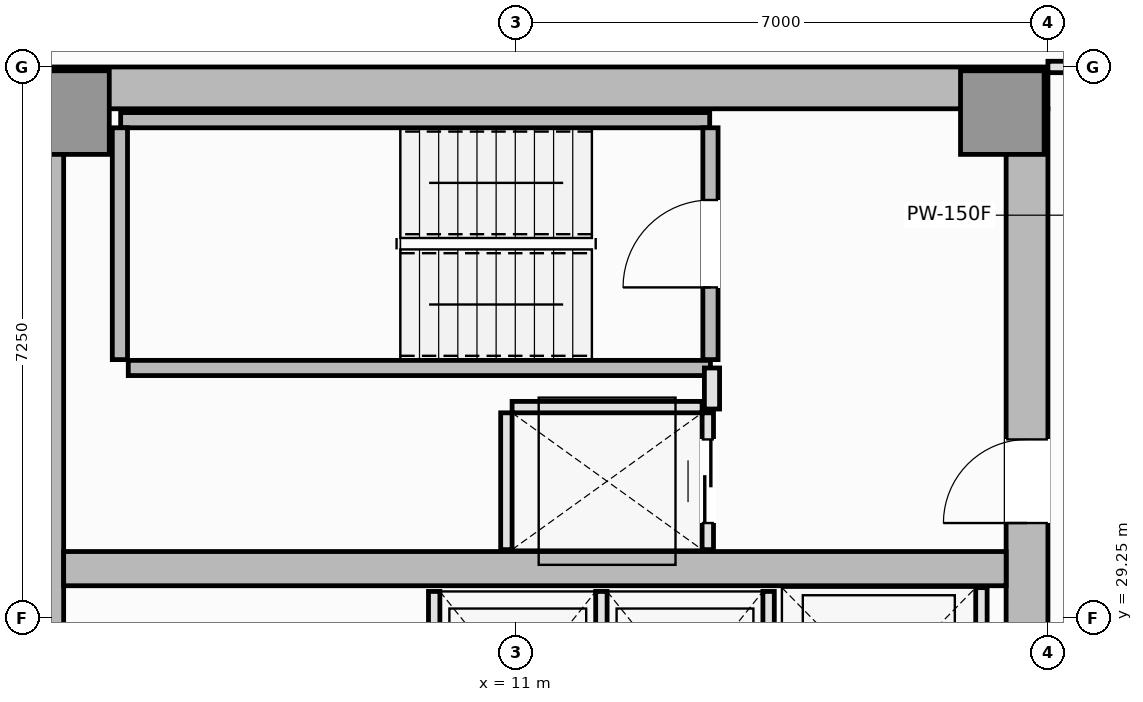
"""IFC4 building model, lengths in metres.
Left out: names, types, materials, properties, quantities, classifications, styles, units other than length and angle.
Written with IfcOpenShell. Run it as: python <this file> out.ifc"""

import sys

from ifc_helpers import new_model, si_unit, direction, frame, frame_2d, origin, origin_2d, place, context, subcontext, project, spatial, rectangle, extrude, element, fill, save


model = new_model("IFC4")
c1 = context("Model", 3, precision=1e-05, world=origin(), true_north=direction((0.0, 1.0)))
c2 = subcontext(c1, "Body", "Model", "MODEL_VIEW")
j1 = project(units=[si_unit("LENGTHUNIT", "METRE"), si_unit("PLANEANGLEUNIT", "RADIAN")], contexts=[c1])
p1 = place(None, origin())
s1 = spatial("IfcSite", under=j1, at=p1, CompositionType="ELEMENT")
p2 = place(p1, origin())
s2 = spatial("IfcBuilding", under=s1, at=p2, CompositionType="ELEMENT")
p3 = place(p2, frame((0.0, 0.0, 191.6)))
s3 = spatial("IfcBuildingStorey", under=s2, at=p3, CompositionType="ELEMENT", Elevation=191.6)
p4 = place(p3, frame((4.5, 36.225, 0.0), z_axis=(0.0, 0.0, 1.0), x_axis=(1.0, 0.0, 0.0)))
e1 = element("IfcWall", 1, at=p4, inside=s3, PredefinedType="SHEAR", context=c2, shape_type="SweptSolid", body=[
    extrude(rectangle(XDim=13.5, YDim=0.55, at=frame_2d((6.75, 0.0))), origin(), (0.0, 0.0, 1.0), 3.55),
])
p5 = place(p3, frame((4.775, 14.55, 0.0), z_axis=(0.0, 0.0, 1.0), x_axis=(0.0, 1.0, 0.0)))
e2 = element("IfcWall", 2, at=p5, inside=s3, PredefinedType="SHEAR", context=c2, shape_type="SweptSolid", body=[
    extrude(rectangle(XDim=21.4, YDim=0.55, at=frame_2d((10.7, 0.0))), origin(), (0.0, 0.0, 1.0), 3.55),
])
p6 = place(p3, frame((17.725, 27.05, 0.0), z_axis=(0.0, 0.0, 1.0), x_axis=(0.0, 1.0, 0.0)))
e3 = element("IfcWall", 3, at=p6, inside=s3, PredefinedType="SHEAR", context=c2, shape_type="SweptSolid", body=[
    extrude(rectangle(XDim=8.9, YDim=0.55, at=frame_2d((4.45, 0.0))), origin(), (0.0, 0.0, 1.0), 3.55),
])
p7 = place(p6, frame((3.45, 0.0, 0.0)))
e4 = element("IfcOpeningElement", 4, at=p7, cuts=e3, PredefinedType="OPENING", context=c2, shape_type="SweptSolid", body=[
    extrude(rectangle(XDim=1.1, YDim=2.15, at=frame_2d((0.55, 1.075))), frame((0.0, 0.285, 0.0), z_axis=(0.0, -1.0, 0.0), x_axis=(1.0, 0.0, 0.0)), (0.0, 0.0, 1.0), 0.57),
])
p8 = place(p3, frame((5.05, 29.9, 0.0), z_axis=(0.0, 0.0, 1.0), x_axis=(1.0, 0.0, 0.0)))
e5 = element("IfcWall", 5, at=p8, inside=s3, PredefinedType="SHEAR", context=c2, shape_type="SweptSolid", body=[
    extrude(rectangle(XDim=12.4, YDim=0.45, at=frame_2d((6.2, 0.0))), origin(), (0.0, 0.0, 1.0), 3.55),
])
for number, where, z_axis, x_axis in (
    (6, (5.1, 35.9, 0.0), (0.0, 0.0, 1.0), (1.0, 0.0, 0.0)),
    (7, (17.4, 35.9, 0.0), (0.0, 0.0, 1.0), (1.0, 0.0, 0.0)),
):
    element("IfcColumn", number, at=place(p3, frame(where, z_axis=z_axis, x_axis=x_axis)), inside=s3, PredefinedType="PILASTER", context=c2, shape_type="SweptSolid", body=[
        extrude(rectangle(XDim=1.1, YDim=1.1, at=origin_2d()), origin(), (0.0, 0.0, 1.0), 3.55),
    ])
p9 = place(p3, frame((5.8, 35.8, 0.0), z_axis=(0.0, 0.0, 1.0), x_axis=(1.0, 0.0, 0.0)))
e8 = element("IfcWall", 8, at=p9, inside=s3, PredefinedType="SOLIDWALL", context=c2, shape_type="SweptSolid", body=[
    extrude(rectangle(XDim=7.75, YDim=0.2, at=frame_2d((3.875, 0.0))), origin(), (0.0, 0.0, 1.0), 3.55),
])
p10 = place(p3, frame((5.79, 32.65, 0.0), z_axis=(0.0, 0.0, 1.0), x_axis=(0.0, 1.0, 0.0)))
e9 = element("IfcWall", 9, at=p10, inside=s3, PredefinedType="SOLIDWALL", context=c2, shape_type="SweptSolid", body=[
    extrude(rectangle(XDim=3.05, YDim=0.2, at=frame_2d((1.525, 0.0))), origin(), (0.0, 0.0, 1.0), 3.55),
])
p11 = place(p3, frame((5.9, 32.54, 0.0), z_axis=(0.0, 0.0, 1.0), x_axis=(1.0, 0.0, 0.0)))
e10 = element("IfcWall", 10, at=p11, inside=s3, PredefinedType="SOLIDWALL", context=c2, shape_type="SweptSolid", body=[
    extrude(rectangle(XDim=7.66, YDim=0.2, at=frame_2d((3.83, 0.0))), origin(), (0.0, 0.0, 1.0), 3.55),
])
p12 = place(p3, frame((13.56, 32.65, 0.0), z_axis=(0.0, 0.0, 1.0), x_axis=(0.0, 1.0, 0.0)))
e11 = element("IfcWall", 11, at=p12, inside=s3, PredefinedType="SOLIDWALL", context=c2, shape_type="SweptSolid", body=[
    extrude(rectangle(XDim=3.05, YDim=0.2, at=frame_2d((1.525, 0.0))), origin(), (0.0, 0.0, 1.0), 3.55),
])
p13 = place(p12, frame((0.95, 0.0, 0.0)))
e12 = element("IfcOpeningElement", 12, at=p13, cuts=e11, PredefinedType="OPENING", context=c2, shape_type="SweptSolid", body=[
    extrude(rectangle(XDim=1.15, YDim=2.15, at=frame_2d((0.575, 1.075))), frame((0.0, 0.11, 0.0), z_axis=(0.0, -1.0, 0.0), x_axis=(1.0, 0.0, 0.0)), (0.0, 0.0, 1.0), 0.22),
])
for number, where, z_axis, x_axis in (
    (13, (9.925, 27.05, 0.0), (0.0, 0.0, 1.0), (0.0, 1.0, 0.0)),
    (14, (12.125, 27.05, 0.0), (0.0, 0.0, 1.0), (0.0, 1.0, 0.0)),
    (15, (14.325, 27.05, 0.0), (0.0, 0.0, 1.0), (0.0, 1.0, 0.0)),
):
    element("IfcWall", number, at=place(p3, frame(where, z_axis=z_axis, x_axis=x_axis)), inside=s3, PredefinedType="PARTITIONING", context=c2, shape_type="SweptSolid", body=[
        extrude(rectangle(XDim=2.55, YDim=0.15, at=frame_2d((1.275, 0.0))), origin(), (0.0, 0.0, 1.0), 3.37),
    ])
p14 = place(p3, frame((17.125, 27.05, 0.0), z_axis=(0.0, 0.0, 1.0), x_axis=(0.0, 1.0, 0.0)))
e16 = element("IfcWall", 16, at=p14, inside=s3, PredefinedType="PARTITIONING", context=c2, shape_type="SweptSolid", body=[
    extrude(rectangle(XDim=2.6, YDim=0.15, at=frame_2d((1.3, 0.0))), origin(), (0.0, 0.0, 1.0), 3.37),
])
p15 = place(p3, frame((10.95, 32.025, 0.0), z_axis=(0.0, 0.0, 1.0), x_axis=(1.0, 0.0, 0.0)))
e17 = element("IfcWall", 17, at=p15, inside=s3, PredefinedType="PARTITIONING", context=c2, shape_type="SweptSolid", body=[
    extrude(rectangle(XDim=2.5, YDim=0.15, at=frame_2d((1.25, 0.0))), origin(), (0.0, 0.0, 1.0), 3.37),
])
p16 = place(p3, frame((10.875, 30.15, 0.0), z_axis=(0.0, 0.0, 1.0), x_axis=(0.0, 1.0, 0.0)))
e18 = element("IfcWall", 18, at=p16, inside=s3, PredefinedType="PARTITIONING", context=c2, shape_type="SweptSolid", body=[
    extrude(rectangle(XDim=1.8, YDim=0.15, at=frame_2d((0.9, 0.0))), origin(), (0.0, 0.0, 1.0), 3.37),
])
p17 = place(p3, frame((13.525, 30.15, 0.0), z_axis=(0.0, 0.0, 1.0), x_axis=(0.0, 1.0, 0.0)))
e19 = element("IfcWall", 19, at=p17, inside=s3, PredefinedType="PARTITIONING", context=c2, shape_type="SweptSolid", body=[
    extrude(rectangle(XDim=1.8, YDim=0.15, at=frame_2d((0.9, 0.0))), origin(), (0.0, 0.0, 1.0), 3.37),
])
p18 = place(p17, frame((0.35, 0.0, 0.0)))
e20 = element("IfcOpeningElement", 20, at=p18, cuts=e19, PredefinedType="OPENING", context=c2, shape_type="SweptSolid", body=[
    extrude(rectangle(XDim=1.1, YDim=2.2, at=frame_2d((0.55, 1.1))), frame((0.0, 0.085, 0.0), z_axis=(0.0, -1.0, 0.0), x_axis=(1.0, 0.0, 0.0)), (0.0, 0.0, 1.0), 0.17),
])
p19 = place(p3, frame((13.58, 32.0, 0.0), z_axis=(0.0, 0.0, 1.0), x_axis=(0.0, 1.0, 0.0)))
e21 = element("IfcWall", 21, at=p19, inside=s3, PredefinedType="PARTITIONING", context=c2, shape_type="SweptSolid", body=[
    extrude(rectangle(XDim=0.54, YDim=0.2, at=frame_2d((0.27, 0.0))), origin(), (0.0, 0.0, 1.0), 3.37),
])
p20 = place(p3, frame((18.0, 36.5, 0.0), z_axis=(0.0, 0.0, 1.0), x_axis=(1.0, 0.0, 0.0)))
e22 = element("IfcWall", 22, at=p20, inside=s3, PredefinedType="PARTITIONING", context=c2, shape_type="SweptSolid", body=[
    extrude(rectangle(XDim=1.9, YDim=0.15, at=frame_2d((0.95, 0.0))), origin(), (0.0, 0.0, 1.0), 3.37),
])
p21 = place(p20, frame((0.5, 0.0, 0.0)))
e23 = element("IfcOpeningElement", 23, at=p21, cuts=e22, PredefinedType="OPENING", context=c2, shape_type="SweptSolid", body=[
    extrude(rectangle(XDim=0.9, YDim=2.1, at=frame_2d((0.45, 1.05))), frame((0.0, 0.085, 0.0), z_axis=(0.0, -1.0, 0.0), x_axis=(1.0, 0.0, 0.0)), (0.0, 0.0, 1.0), 0.17),
])
p22 = place(p13, origin())
e24 = element("IfcDoor", 24, at=p22, inside=s3, OperationType="SINGLE_SWING_LEFT", PredefinedType="DOOR", context=c2, shape_type="SweptSolid", body=[
    extrude(rectangle(XDim=1.15, YDim=2.15, at=frame_2d((0.575, 1.075))), frame((0.0, 0.025, 0.0), z_axis=(0.0, -1.0, 0.0), x_axis=(1.0, 0.0, 0.0)), (0.0, 0.0, 1.0), 0.05),
])
fill(e12, e24)
p23 = place(p18, origin())
e25 = element("IfcDoor", 25, at=p23, inside=s3, OperationType="DOUBLE_DOOR_SLIDING", PredefinedType="DOOR", context=c2, shape_type="SweptSolid", body=[
    extrude(rectangle(XDim=1.1, YDim=2.2, at=frame_2d((0.55, 1.1))), frame((0.0, 0.025, 0.0), z_axis=(0.0, -1.0, 0.0), x_axis=(1.0, 0.0, 0.0)), (0.0, 0.0, 1.0), 0.05),
])
fill(e20, e25)
p24 = place(p7, origin())
e26 = element("IfcDoor", 26, at=p24, inside=s3, OperationType="SINGLE_SWING_LEFT", PredefinedType="DOOR", context=c2, shape_type="SweptSolid", body=[
    extrude(rectangle(XDim=1.1, YDim=2.15, at=frame_2d((0.55, 1.075))), frame((0.0, 0.025, 0.0), z_axis=(0.0, -1.0, 0.0), x_axis=(1.0, 0.0, 0.0)), (0.0, 0.0, 1.0), 0.05),
])
fill(e4, e26)
save(model, sys.argv[1])
